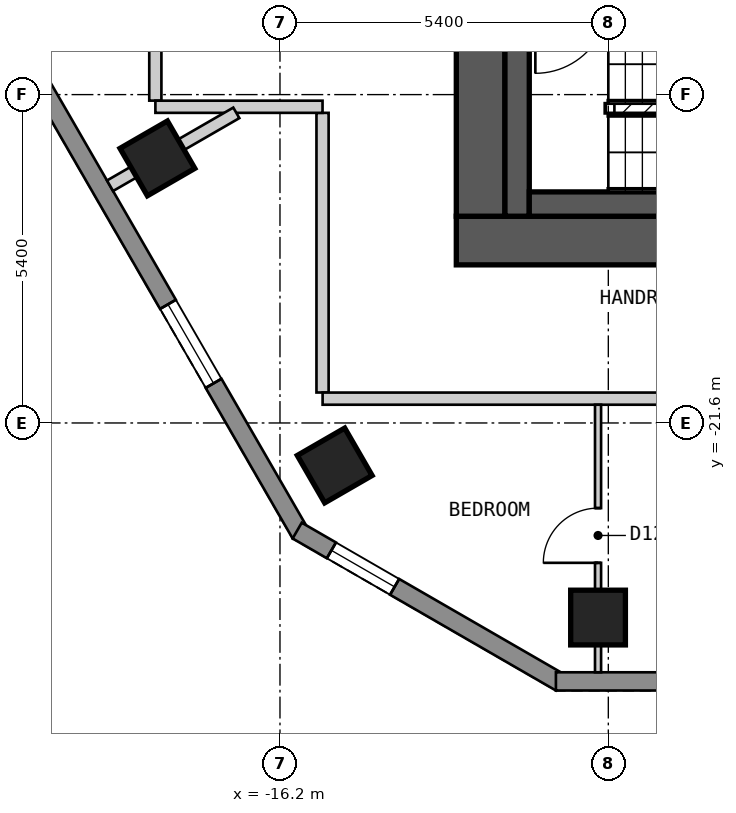
"""IFC4 building model, lengths in metres.
Left out: names, types, materials, properties, quantities, classifications, styles, units other than length and angle.
Written with IfcOpenShell. Run it as: python <this file> out.ifc"""

import sys

from ifc_helpers import new_model, si_unit, direction, frame, frame_2d, origin, origin_2d, place, context, subcontext, project, spatial, polyline, rectangle, outline, extrude, element, fill, save


model = new_model("IFC4")
c1 = context("Model", 3, precision=1e-05, world=origin(), true_north=direction((0.0, 1.0)))
c2 = subcontext(c1, "Body", "Model", "MODEL_VIEW")
j1 = project(units=[si_unit("LENGTHUNIT", "METRE"), si_unit("PLANEANGLEUNIT", "RADIAN")], contexts=[c1])
p1 = place(None, origin())
s1 = spatial("IfcSite", under=j1, at=p1, CompositionType="ELEMENT")
p2 = place(p1, origin())
s2 = spatial("IfcBuilding", under=s1, at=p2, CompositionType="ELEMENT")
p3 = place(p2, frame((0.0, 0.0, 117.6)))
s3 = spatial("IfcBuildingStorey", under=s2, at=p3, CompositionType="ELEMENT", Elevation=117.6)
for number, where, z_axis, x_axis in (
    (1, (-18.216, -17.249, 0.0), (0.0, 0.0, 1.0), (0.5, -0.866, 0.0)),
    (2, (-15.3, -22.299, 0.0), (0.0, 0.0, 1.0), (0.5, -0.866, 0.0)),
    (3, (-10.969, -24.8, 0.0), (0.0, 0.0, 1.0), (1.0, 0.0, 0.0)),
):
    element("IfcColumn", number, at=place(p3, frame(where, z_axis=z_axis, x_axis=x_axis)), inside=s3, PredefinedType="COLUMN", context=c2, shape_type="SweptSolid", body=[
        extrude(rectangle(XDim=0.9, YDim=0.9, at=origin_2d()), origin(), (0.0, 0.0, 1.0), 3.0),
    ])
p4 = place(p3, frame((-13.3, -18.6, 0.0), z_axis=(0.0, 0.0, 1.0), x_axis=(1.0, 0.0, 0.0)))
e4 = element("IfcWall", 4, at=p4, inside=s3, PredefinedType="SHEAR", context=c2, shape_type="SweptSolid", body=[
    extrude(rectangle(XDim=26.6, YDim=0.8, at=frame_2d((13.3, 0.0))), origin(), (0.0, 0.0, 1.0), 2.7),
])
p5 = place(p3, frame((-12.9, -18.2, 0.0), z_axis=(0.0, 0.0, 1.0), x_axis=(0.0, 1.0, 0.0)))
e5 = element("IfcWall", 5, at=p5, inside=s3, PredefinedType="SHEAR", context=c2, shape_type="SweptSolid", body=[
    extrude(rectangle(XDim=12.4, YDim=0.8, at=frame_2d((6.2, 0.0))), origin(), (0.0, 0.0, 1.0), 2.7),
])
p6 = place(p5, frame((4.0, 0.0, 0.0)))
e6 = element("IfcOpeningElement", 6, at=p6, cuts=e5, PredefinedType="OPENING", context=c2, shape_type="SweptSolid", body=[
    extrude(rectangle(XDim=1.2, YDim=2.1, at=frame_2d((0.6, 1.05))), frame((0.0, 0.41, 0.0), z_axis=(0.0, -1.0, 0.0), x_axis=(1.0, 0.0, 0.0)), (0.0, 0.0, 1.0), 0.82),
])
p7 = place(p3, frame((-28.218, -2.025, 0.0), z_axis=(0.0, 0.0, 1.0), x_axis=(0.500017503135, -0.866015298109, 0.0)))
e7 = element("IfcWall", 7, at=p7, inside=s3, PredefinedType="SOLIDWALL", context=c2, shape_type="SweptSolid", body=[
    extrude(outline(polyline([(0.0, -0.15), (24.711, -0.15), (24.631, 0.15), (0.08, 0.15), (0.0, -0.15)])), origin(), (0.0, 0.0, 1.0), 2.7),
])
p8 = place(p7, frame((2.857, 0.0, 0.15)))
e8 = element("IfcOpeningElement", 8, at=p8, cuts=e7, PredefinedType="OPENING", context=c2, shape_type="SweptSolid", body=[
    extrude(rectangle(XDim=1.5, YDim=2.1, at=frame_2d((0.75, 1.05))), frame((0.0, 0.16, 0.0), z_axis=(0.0, -1.0, 0.0), x_axis=(1.0, 0.0, 0.0)), (0.0, 0.0, 1.0), 0.32),
])
p9 = place(p7, frame((8.689, 0.0, 0.15)))
e9 = element("IfcOpeningElement", 9, at=p9, cuts=e7, PredefinedType="OPENING", context=c2, shape_type="SweptSolid", body=[
    extrude(rectangle(XDim=1.5, YDim=2.1, at=frame_2d((0.75, 1.05))), frame((0.0, 0.16, 0.0), z_axis=(0.0, -1.0, 0.0), x_axis=(1.0, 0.0, 0.0)), (0.0, 0.0, 1.0), 0.32),
])
p10 = place(p7, frame((14.52, 0.0, 0.15)))
e10 = element("IfcOpeningElement", 10, at=p10, cuts=e7, PredefinedType="OPENING", context=c2, shape_type="SweptSolid", body=[
    extrude(rectangle(XDim=1.5, YDim=2.1, at=frame_2d((0.75, 1.05))), frame((0.0, 0.16, 0.0), z_axis=(0.0, -1.0, 0.0), x_axis=(1.0, 0.0, 0.0)), (0.0, 0.0, 1.0), 0.32),
])
p11 = place(p7, frame((20.351, 0.0, 0.15)))
e11 = element("IfcOpeningElement", 11, at=p11, cuts=e7, PredefinedType="OPENING", context=c2, shape_type="SweptSolid", body=[
    extrude(rectangle(XDim=1.5, YDim=2.1, at=frame_2d((0.75, 1.05))), frame((0.0, 0.16, 0.0), z_axis=(0.0, -1.0, 0.0), x_axis=(1.0, 0.0, 0.0)), (0.0, 0.0, 1.0), 0.32),
])
p12 = place(p3, frame((-15.917, -23.37, 0.0), z_axis=(0.0, 0.0, 1.0), x_axis=(0.866022959057, -0.500004234368, 0.0)))
e12 = element("IfcWall", 12, at=p12, inside=s3, PredefinedType="SOLIDWALL", context=c2, shape_type="SweptSolid", body=[
    extrude(outline(polyline([(0.0, -0.15), (5.0, -0.15), (4.92, 0.15), (0.08, 0.15), (0.0, -0.15)])), origin(), (0.0, 0.0, 1.0), 2.7),
])
p13 = place(p12, frame((0.65, 0.0, 0.15)))
e13 = element("IfcOpeningElement", 13, at=p13, cuts=e12, PredefinedType="OPENING", context=c2, shape_type="SweptSolid", body=[
    extrude(rectangle(XDim=1.2, YDim=2.1, at=frame_2d((0.6, 1.05))), frame((0.0, 0.16, 0.0), z_axis=(0.0, -1.0, 0.0), x_axis=(1.0, 0.0, 0.0)), (0.0, 0.0, 1.0), 0.32),
])
p14 = place(p3, frame((-11.662, -25.85, 0.0), z_axis=(0.0, 0.0, 1.0), x_axis=(1.0, 0.0, 0.0)))
e14 = element("IfcWall", 14, at=p14, inside=s3, PredefinedType="SOLIDWALL", context=c2, shape_type="SweptSolid", body=[
    extrude(outline(polyline([(0.0, -0.15), (23.324, -0.15), (23.244, 0.15), (0.08, 0.15), (0.0, -0.15)])), origin(), (0.0, 0.0, 1.0), 2.7),
])
p15 = place(p14, frame((2.686, 0.0, 0.15)))
e15 = element("IfcOpeningElement", 15, at=p15, cuts=e14, PredefinedType="OPENING", context=c2, shape_type="SweptSolid", body=[
    extrude(rectangle(XDim=1.5, YDim=2.1, at=frame_2d((0.75, 1.05))), frame((0.0, 0.16, 0.0), z_axis=(0.0, -1.0, 0.0), x_axis=(1.0, 0.0, 0.0)), (0.0, 0.0, 1.0), 0.32),
])
p16 = place(p14, frame((8.17, 0.0, 0.15)))
e16 = element("IfcOpeningElement", 16, at=p16, cuts=e14, PredefinedType="OPENING", context=c2, shape_type="SweptSolid", body=[
    extrude(rectangle(XDim=1.5, YDim=2.1, at=frame_2d((0.75, 1.05))), frame((0.0, 0.16, 0.0), z_axis=(0.0, -1.0, 0.0), x_axis=(1.0, 0.0, 0.0)), (0.0, 0.0, 1.0), 0.32),
])
p17 = place(p14, frame((13.656, 0.0, 0.15)))
e17 = element("IfcOpeningElement", 17, at=p17, cuts=e14, PredefinedType="OPENING", context=c2, shape_type="SweptSolid", body=[
    extrude(rectangle(XDim=1.5, YDim=2.1, at=frame_2d((0.75, 1.05))), frame((0.0, 0.16, 0.0), z_axis=(0.0, -1.0, 0.0), x_axis=(1.0, 0.0, 0.0)), (0.0, 0.0, 1.0), 0.32),
])
p18 = place(p14, frame((19.141, 0.0, 0.15)))
e18 = element("IfcOpeningElement", 18, at=p18, cuts=e14, PredefinedType="OPENING", context=c2, shape_type="SweptSolid", body=[
    extrude(rectangle(XDim=1.5, YDim=2.1, at=frame_2d((0.75, 1.05))), frame((0.0, 0.16, 0.0), z_axis=(0.0, -1.0, 0.0), x_axis=(1.0, 0.0, 0.0)), (0.0, 0.0, 1.0), 0.32),
])
p19 = place(p3, frame((-15.5, -16.5, 0.0), z_axis=(0.0, 0.0, 1.0), x_axis=(0.0, -1.0, 0.0)))
e19 = element("IfcWall", 19, at=p19, inside=s3, PredefinedType="PARTITIONING", context=c2, shape_type="SweptSolid", body=[
    extrude(rectangle(XDim=4.599, YDim=0.2, at=frame_2d((2.3, 0.0))), origin(), (0.0, 0.0, 1.0), 2.7),
])
p20 = place(p3, frame((-18.25, -10.593, 0.0), z_axis=(0.0, 0.0, 1.0), x_axis=(0.0, -1.0, 0.0)))
e20 = element("IfcWall", 20, at=p20, inside=s3, PredefinedType="PARTITIONING", context=c2, shape_type="SweptSolid", body=[
    extrude(rectangle(XDim=5.706, YDim=0.2, at=frame_2d((2.853, 0.0))), origin(), (0.0, 0.0, 1.0), 2.7),
])
p21 = place(p3, frame((-18.249, -16.4, 0.0), z_axis=(0.0, 0.0, 1.0), x_axis=(1.0, 0.0, 0.0)))
e21 = element("IfcWall", 21, at=p21, inside=s3, PredefinedType="PARTITIONING", context=c2, shape_type="SweptSolid", body=[
    extrude(rectangle(XDim=2.749, YDim=0.2, at=frame_2d((1.375, 0.0))), origin(), (0.0, 0.0, 1.0), 2.7),
])
p22 = place(p3, frame((-15.499, -21.2, 0.0), z_axis=(0.0, 0.0, 1.0), x_axis=(1.0, 0.0, 0.0)))
e22 = element("IfcWall", 22, at=p22, inside=s3, PredefinedType="PARTITIONING", context=c2, shape_type="SweptSolid", body=[
    extrude(rectangle(XDim=30.898, YDim=0.2, at=frame_2d((15.449, 0.0))), origin(), (0.0, 0.0, 1.0), 2.7),
])
p23 = place(p22, frame((12.258, 0.0, 0.0)))
e23 = element("IfcOpeningElement", 23, at=p23, cuts=e22, PredefinedType="OPENING", context=c2, shape_type="SweptSolid", body=[
    extrude(rectangle(XDim=1.0, YDim=2.1, at=frame_2d((0.5, 1.05))), frame((0.0, 0.11, 0.0), z_axis=(0.0, -1.0, 0.0), x_axis=(1.0, 0.0, 0.0)), (0.0, 0.0, 1.0), 0.22),
])
p24 = place(p22, frame((23.228, 0.0, 0.0)))
e24 = element("IfcOpeningElement", 24, at=p24, cuts=e22, PredefinedType="OPENING", context=c2, shape_type="SweptSolid", body=[
    extrude(rectangle(XDim=1.0, YDim=2.1, at=frame_2d((0.5, 1.05))), frame((0.0, 0.11, 0.0), z_axis=(0.0, -1.0, 0.0), x_axis=(1.0, 0.0, 0.0)), (0.0, 0.0, 1.0), 0.22),
])
p25 = place(p3, frame((-10.969, -25.7, 0.0), z_axis=(0.0, 0.0, 1.0), x_axis=(0.0, 1.0, 0.0)))
e25 = element("IfcWall", 25, at=p25, inside=s3, PredefinedType="PARTITIONING", context=c2, shape_type="SweptSolid", body=[
    extrude(rectangle(XDim=4.4, YDim=0.1, at=frame_2d((2.2, 0.0))), origin(), (0.0, 0.0, 1.0), 2.7),
])
p26 = place(p25, frame((1.8, 0.0, 0.0)))
e26 = element("IfcOpeningElement", 26, at=p26, cuts=e25, PredefinedType="OPENING", context=c2, shape_type="SweptSolid", body=[
    extrude(rectangle(XDim=0.9, YDim=2.1, at=frame_2d((0.45, 1.05))), frame((0.0, 0.06, 0.0), z_axis=(0.0, -1.0, 0.0), x_axis=(1.0, 0.0, 0.0)), (0.0, 0.0, 1.0), 0.12),
])
p27 = place(p3, frame((-18.995, -17.699, 0.0), z_axis=(0.0, 0.0, 1.0), x_axis=(0.86607371389, 0.499916315105, 0.0)))
e27 = element("IfcWall", 27, at=p27, inside=s3, PredefinedType="PARTITIONING", context=c2, shape_type="SweptSolid", body=[
    extrude(rectangle(XDim=2.398, YDim=0.2, at=frame_2d((1.199, 0.0))), origin(), (0.0, 0.0, 1.0), 2.7),
])
p28 = place(p3, frame((-12.3, -18.2, 0.0), z_axis=(0.0, 0.0, 1.0), x_axis=(0.0, 1.0, 0.0)))
e28 = element("IfcWall", 28, at=p28, inside=s3, PredefinedType="SOLIDWALL", context=c2, shape_type="SweptSolid", body=[
    extrude(rectangle(XDim=3.35, YDim=0.4, at=frame_2d((1.675, 0.0))), origin(), (0.0, 0.0, 1.0), 2.7),
])
p29 = place(p3, frame((-12.1, -18.0, 0.0), z_axis=(0.0, 0.0, 1.0), x_axis=(1.0, 0.0, 0.0)))
e29 = element("IfcWall", 29, at=p29, inside=s3, PredefinedType="SOLIDWALL", context=c2, shape_type="SweptSolid", body=[
    extrude(rectangle(XDim=5.4, YDim=0.4, at=frame_2d((2.7, 0.0))), origin(), (0.0, 0.0, 1.0), 2.7),
])
p30 = place(p11, origin())
e30 = element("IfcWindow", 30, at=p30, inside=s3, PartitioningType="SINGLE_PANEL", PredefinedType="WINDOW", context=c2, shape_type="SweptSolid", body=[
    extrude(rectangle(XDim=1.5, YDim=2.1, at=frame_2d((0.75, 1.05))), frame((0.0, 0.03, 0.0), z_axis=(0.0, -1.0, 0.0), x_axis=(1.0, 0.0, 0.0)), (0.0, 0.0, 1.0), 0.06),
])
fill(e11, e30)
p31 = place(p13, origin())
e31 = element("IfcWindow", 31, at=p31, inside=s3, PartitioningType="SINGLE_PANEL", PredefinedType="WINDOW", context=c2, shape_type="SweptSolid", body=[
    extrude(rectangle(XDim=1.2, YDim=2.1, at=frame_2d((0.6, 1.05))), frame((0.0, 0.03, 0.0), z_axis=(0.0, -1.0, 0.0), x_axis=(1.0, 0.0, 0.0)), (0.0, 0.0, 1.0), 0.06),
])
fill(e13, e31)
p32 = place(p26, origin())
e32 = element("IfcDoor", 32, at=p32, inside=s3, OperationType="SINGLE_SWING_LEFT", PredefinedType="DOOR", context=c2, shape_type="SweptSolid", body=[
    extrude(rectangle(XDim=0.9, YDim=2.1, at=frame_2d((0.45, 1.05))), frame((0.0, 0.025, 0.0), z_axis=(0.0, -1.0, 0.0), x_axis=(1.0, 0.0, 0.0)), (0.0, 0.0, 1.0), 0.05),
])
fill(e26, e32)
save(model, sys.argv[1])
